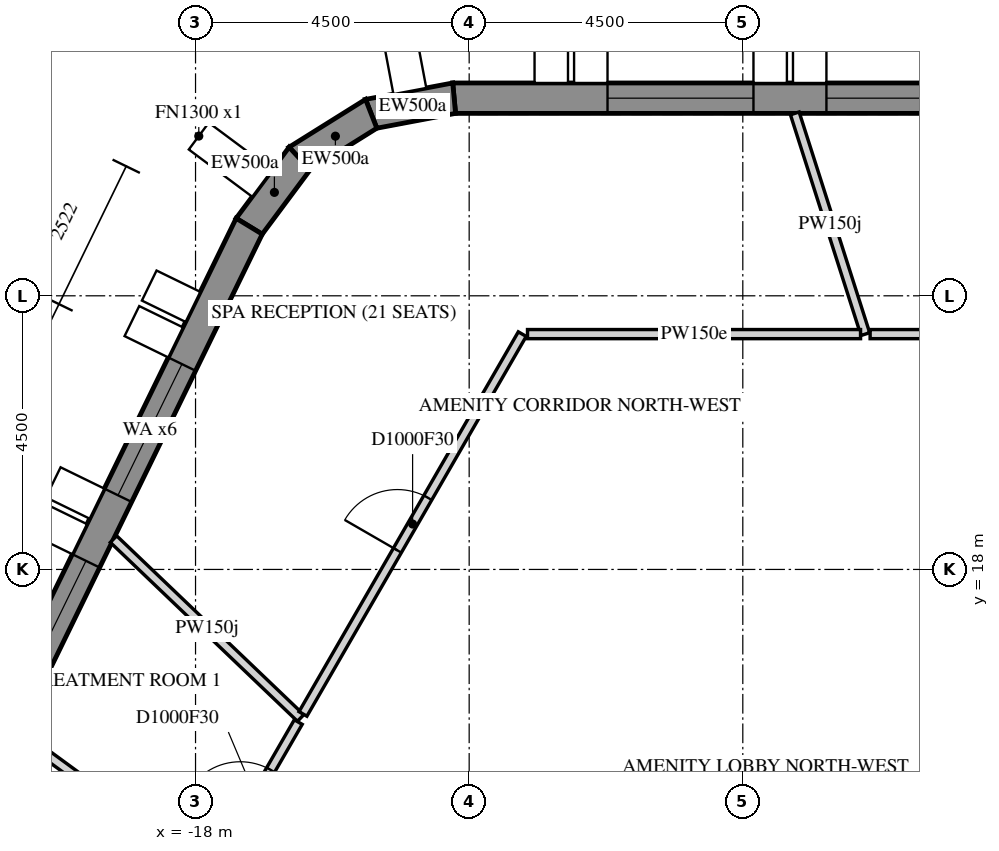
"""IFC4 building model, lengths in metres.
Left out: names, types, materials, properties, quantities, classifications, styles, units other than length and angle.
Written with IfcOpenShell. Run it as: python <this file> out.ifc"""

import sys

from ifc_helpers import new_model, si_unit, direction, frame, frame_2d, origin, place, context, subcontext, project, spatial, polyline, rectangle, outline, extrude, element, fill, save


model = new_model("IFC4")
c1 = context("Model", 3, precision=1e-05, world=origin(), true_north=direction((0.0, 1.0)))
c2 = subcontext(c1, "Body", "Model", "MODEL_VIEW")
j1 = project(units=[si_unit("LENGTHUNIT", "METRE"), si_unit("PLANEANGLEUNIT", "RADIAN")], contexts=[c1])
p1 = place(None, origin())
s1 = spatial("IfcSite", under=j1, at=p1, CompositionType="ELEMENT")
p2 = place(p1, origin())
s2 = spatial("IfcBuilding", under=s1, at=p2, CompositionType="ELEMENT")
p3 = place(p2, frame((0.0, 0.0, 338.1)))
s3 = spatial("IfcBuildingStorey", under=s2, at=p3, CompositionType="ELEMENT", Elevation=338.1)
p4 = place(p3, frame((11.698, 25.75, -0.3), z_axis=(0.0, 0.0, 1.0), x_axis=(-1.0, 0.0, 0.0)))
e1 = element("IfcWall", 1, at=p4, inside=s3, PredefinedType="SOLIDWALL", context=c2, shape_type="SweptSolid", body=[
    extrude(outline(polyline([(-0.021, -0.25), (25.468, -0.25), (25.421, 0.25), (0.021, 0.25), (-0.021, -0.25)])), origin(), (0.0, 0.0, 1.0), 5.4),
])
p5 = place(p4, frame((2.522, 0.0, 1.2)))
e2 = element("IfcOpeningElement", 2, at=p5, cuts=e1, PredefinedType="OPENING", context=c2, shape_type="SweptSolid", body=[
    extrude(rectangle(XDim=2.4, YDim=3.6, at=frame_2d((1.2, 1.8))), frame((0.0, 0.26, 0.0), z_axis=(0.0, -1.0, 0.0), x_axis=(1.0, 0.0, 0.0)), (0.0, 0.0, 1.0), 0.52),
])
p6 = place(p4, frame((6.122, 0.0, 1.2)))
e3 = element("IfcOpeningElement", 3, at=p6, cuts=e1, PredefinedType="OPENING", context=c2, shape_type="SweptSolid", body=[
    extrude(rectangle(XDim=2.4, YDim=3.6, at=frame_2d((1.2, 1.8))), frame((0.0, 0.26, 0.0), z_axis=(0.0, -1.0, 0.0), x_axis=(1.0, 0.0, 0.0)), (0.0, 0.0, 1.0), 0.52),
])
p7 = place(p4, frame((9.722, 0.0, 1.2)))
e4 = element("IfcOpeningElement", 4, at=p7, cuts=e1, PredefinedType="OPENING", context=c2, shape_type="SweptSolid", body=[
    extrude(rectangle(XDim=2.4, YDim=3.6, at=frame_2d((1.2, 1.8))), frame((0.0, 0.26, 0.0), z_axis=(0.0, -1.0, 0.0), x_axis=(1.0, 0.0, 0.0)), (0.0, 0.0, 1.0), 0.52),
])
p8 = place(p4, frame((13.323, 0.0, 1.2)))
e5 = element("IfcOpeningElement", 5, at=p8, cuts=e1, PredefinedType="OPENING", context=c2, shape_type="SweptSolid", body=[
    extrude(rectangle(XDim=2.4, YDim=3.6, at=frame_2d((1.2, 1.8))), frame((0.0, 0.26, 0.0), z_axis=(0.0, -1.0, 0.0), x_axis=(1.0, 0.0, 0.0)), (0.0, 0.0, 1.0), 0.52),
])
p9 = place(p4, frame((16.922, 0.0, 1.2)))
e6 = element("IfcOpeningElement", 6, at=p9, cuts=e1, PredefinedType="OPENING", context=c2, shape_type="SweptSolid", body=[
    extrude(rectangle(XDim=2.4, YDim=3.6, at=frame_2d((1.2, 1.8))), frame((0.0, 0.26, 0.0), z_axis=(0.0, -1.0, 0.0), x_axis=(1.0, 0.0, 0.0)), (0.0, 0.0, 1.0), 0.52),
])
p10 = place(p4, frame((20.522, 0.0, 1.2)))
e7 = element("IfcOpeningElement", 7, at=p10, cuts=e1, PredefinedType="OPENING", context=c2, shape_type="SweptSolid", body=[
    extrude(rectangle(XDim=2.4, YDim=3.6, at=frame_2d((1.2, 1.8))), frame((0.0, 0.26, 0.0), z_axis=(0.0, -1.0, 0.0), x_axis=(1.0, 0.0, 0.0)), (0.0, 0.0, 1.0), 0.52),
])
p11 = place(p3, frame((-13.747, 25.75, -0.3), z_axis=(0.0, 0.0, 1.0), x_axis=(-0.982736538448, -0.185010529429, 0.0)))
e8 = element("IfcWall", 8, at=p11, inside=s3, PredefinedType="SOLIDWALL", context=c2, shape_type="SweptSolid", body=[
    extrude(outline(polyline([(-0.023, -0.25), (1.435, -0.25), (1.341, 0.25), (0.023, 0.25), (-0.023, -0.25)])), origin(), (0.0, 0.0, 1.0), 5.4),
])
p12 = place(p3, frame((-15.111, 25.493, -0.3), z_axis=(0.0, 0.0, 1.0), x_axis=(-0.847978544293, -0.530030554231, 0.0)))
e9 = element("IfcWall", 9, at=p12, inside=s3, PredefinedType="SOLIDWALL", context=c2, shape_type="SweptSolid", body=[
    extrude(outline(polyline([(-0.047, -0.25), (1.435, -0.25), (1.341, 0.25), (0.047, 0.25), (-0.047, -0.25)])), origin(), (0.0, 0.0, 1.0), 5.4),
])
p13 = place(p3, frame((-16.289, 24.757, -0.3), z_axis=(0.0, 0.0, 1.0), x_axis=(-0.597210785942, -0.802084332945, 0.0)))
e10 = element("IfcWall", 10, at=p13, inside=s3, PredefinedType="SOLIDWALL", context=c2, shape_type="SweptSolid", body=[
    extrude(outline(polyline([(-0.047, -0.25), (1.412, -0.25), (1.365, 0.25), (0.047, 0.25), (-0.047, -0.25)])), origin(), (0.0, 0.0, 1.0), 5.4),
])
p14 = place(p3, frame((-17.118, 23.644, -0.3), z_axis=(0.0, 0.0, 1.0), x_axis=(-0.438368241894, -0.898795463106, 0.0)))
e11 = element("IfcWall", 11, at=p14, inside=s3, PredefinedType="SOLIDWALL", context=c2, shape_type="SweptSolid", body=[
    extrude(outline(polyline([(-0.023, -0.25), (25.465, -0.25), (25.424, 0.25), (0.023, 0.25), (-0.023, -0.25)])), origin(), (0.0, 0.0, 1.0), 5.4),
])
p15 = place(p14, frame((2.522, 0.0, 1.2)))
e12 = element("IfcOpeningElement", 12, at=p15, cuts=e11, PredefinedType="OPENING", context=c2, shape_type="SweptSolid", body=[
    extrude(rectangle(XDim=2.4, YDim=3.6, at=frame_2d((1.2, 1.8))), frame((0.0, 0.26, 0.0), z_axis=(0.0, -1.0, 0.0), x_axis=(1.0, 0.0, 0.0)), (0.0, 0.0, 1.0), 0.52),
])
p16 = place(p14, frame((6.122, 0.0, 1.2)))
e13 = element("IfcOpeningElement", 13, at=p16, cuts=e11, PredefinedType="OPENING", context=c2, shape_type="SweptSolid", body=[
    extrude(rectangle(XDim=2.4, YDim=3.6, at=frame_2d((1.2, 1.8))), frame((0.0, 0.26, 0.0), z_axis=(0.0, -1.0, 0.0), x_axis=(1.0, 0.0, 0.0)), (0.0, 0.0, 1.0), 0.52),
])
p17 = place(p14, frame((9.722, 0.0, 1.2)))
e14 = element("IfcOpeningElement", 14, at=p17, cuts=e11, PredefinedType="OPENING", context=c2, shape_type="SweptSolid", body=[
    extrude(rectangle(XDim=2.4, YDim=3.6, at=frame_2d((1.2, 1.8))), frame((0.0, 0.26, 0.0), z_axis=(0.0, -1.0, 0.0), x_axis=(1.0, 0.0, 0.0)), (0.0, 0.0, 1.0), 0.52),
])
p18 = place(p14, frame((13.323, 0.0, 1.2)))
e15 = element("IfcOpeningElement", 15, at=p18, cuts=e11, PredefinedType="OPENING", context=c2, shape_type="SweptSolid", body=[
    extrude(rectangle(XDim=2.4, YDim=3.6, at=frame_2d((1.2, 1.8))), frame((0.0, 0.26, 0.0), z_axis=(0.0, -1.0, 0.0), x_axis=(1.0, 0.0, 0.0)), (0.0, 0.0, 1.0), 0.52),
])
p19 = place(p14, frame((16.922, 0.0, 1.2)))
e16 = element("IfcOpeningElement", 16, at=p19, cuts=e11, PredefinedType="OPENING", context=c2, shape_type="SweptSolid", body=[
    extrude(rectangle(XDim=2.4, YDim=3.6, at=frame_2d((1.2, 1.8))), frame((0.0, 0.26, 0.0), z_axis=(0.0, -1.0, 0.0), x_axis=(1.0, 0.0, 0.0)), (0.0, 0.0, 1.0), 0.52),
])
p20 = place(p14, frame((20.522, 0.0, 1.2)))
e17 = element("IfcOpeningElement", 17, at=p20, cuts=e11, PredefinedType="OPENING", context=c2, shape_type="SweptSolid", body=[
    extrude(rectangle(XDim=2.4, YDim=3.6, at=frame_2d((1.2, 1.8))), frame((0.0, 0.26, 0.0), z_axis=(0.0, -1.0, 0.0), x_axis=(1.0, 0.0, 0.0)), (0.0, 0.0, 1.0), 0.52),
])
p21 = place(p3, frame((-20.912, 15.295, 0.0), z_axis=(0.0, 0.0, 1.0), x_axis=(0.807083298113, -0.590437591882, 0.0)))
e18 = element("IfcWall", 18, at=p21, inside=s3, PredefinedType="PARTITIONING", context=c2, shape_type="SweptSolid", body=[
    extrude(rectangle(XDim=3.91, YDim=0.15, at=frame_2d((1.955, 0.0))), origin(), (0.0, 0.0, 1.0), 4.346),
])
p22 = place(p3, frame((-19.349, 18.499, 0.0), z_axis=(0.0, 0.0, 1.0), x_axis=(0.722785064333, -0.691072898309, 0.0)))
e19 = element("IfcWall", 19, at=p22, inside=s3, PredefinedType="PARTITIONING", context=c2, shape_type="SweptSolid", body=[
    extrude(rectangle(XDim=4.257, YDim=0.15, at=frame_2d((2.129, 0.0))), origin(), (0.0, 0.0, 1.0), 4.346),
])
p23 = place(p3, frame((-17.718, 13.051, 0.0), z_axis=(0.0, 0.0, 1.0), x_axis=(0.4998875608, 0.866090310855, 0.0)))
e20 = element("IfcWall", 20, at=p23, inside=s3, PredefinedType="PARTITIONING", context=c2, shape_type="SweptSolid", body=[
    extrude(rectangle(XDim=2.816, YDim=0.15, at=frame_2d((1.408, 0.0))), origin(), (0.0, 0.0, 1.0), 5.1),
])
p24 = place(p23, frame((0.908, 0.0, 0.0)))
e21 = element("IfcOpeningElement", 21, at=p24, cuts=e20, PredefinedType="OPENING", context=c2, shape_type="SweptSolid", body=[
    extrude(rectangle(XDim=1.0, YDim=2.1, at=frame_2d((0.5, 1.05))), frame((0.0, 0.085, 0.0), z_axis=(0.0, -1.0, 0.0), x_axis=(1.0, 0.0, 0.0)), (0.0, 0.0, 1.0), 0.17),
])
p25 = place(p3, frame((-16.233, 15.624, 0.0), z_axis=(0.0, 0.0, 1.0), x_axis=(0.500012524703, 0.866018172523, 0.0)))
e22 = element("IfcWall", 22, at=p25, inside=s3, PredefinedType="PARTITIONING", context=c2, shape_type="SweptSolid", body=[
    extrude(rectangle(XDim=7.213, YDim=0.15, at=frame_2d((3.606, 0.0))), origin(), (0.0, 0.0, 1.0), 5.1),
])
p26 = place(p25, frame((3.106, 0.0, 0.0)))
e23 = element("IfcOpeningElement", 23, at=p26, cuts=e22, PredefinedType="OPENING", context=c2, shape_type="SweptSolid", body=[
    extrude(rectangle(XDim=1.0, YDim=2.1, at=frame_2d((0.5, 1.05))), frame((0.0, 0.085, 0.0), z_axis=(0.0, -1.0, 0.0), x_axis=(1.0, 0.0, 0.0)), (0.0, 0.0, 1.0), 0.17),
])
p27 = place(p3, frame((-8.145, 25.5, 0.0), z_axis=(0.0, 0.0, 1.0), x_axis=(0.304382836825, -0.952549782765, 0.0)))
e24 = element("IfcWall", 24, at=p27, inside=s3, PredefinedType="PARTITIONING", context=c2, shape_type="SweptSolid", body=[
    extrude(rectangle(XDim=3.811, YDim=0.15, at=frame_2d((1.905, 0.0))), origin(), (0.0, 0.0, 1.0), 4.346),
])
p28 = place(p3, frame((-7.064, 21.87, 0.0), z_axis=(0.0, 0.0, 1.0), x_axis=(-1.0, 0.0, 0.0)))
e25 = element("IfcWall", 25, at=p28, inside=s3, PredefinedType="PARTITIONING", context=c2, shape_type="SweptSolid", body=[
    extrude(rectangle(XDim=5.477, YDim=0.15, at=frame_2d((2.738, 0.0))), origin(), (0.0, 0.0, 1.0), 5.1),
])
p29 = place(p3, frame((-6.906, 21.87, 0.0), z_axis=(0.0, 0.0, 1.0), x_axis=(1.0, 0.0, 0.0)))
e26 = element("IfcWall", 26, at=p29, inside=s3, PredefinedType="PARTITIONING", context=c2, shape_type="SweptSolid", body=[
    extrude(rectangle(XDim=19.302, YDim=0.15, at=frame_2d((9.651, 0.0))), origin(), (0.0, 0.0, 1.0), 5.1),
])
p30 = place(p29, frame((8.751, 0.0, 0.0)))
e27 = element("IfcOpeningElement", 27, at=p30, cuts=e26, PredefinedType="OPENING", context=c2, shape_type="SweptSolid", body=[
    extrude(rectangle(XDim=1.8, YDim=2.1, at=frame_2d((0.9, 1.05))), frame((0.0, 0.085, 0.0), z_axis=(0.0, -1.0, 0.0), x_axis=(1.0, 0.0, 0.0)), (0.0, 0.0, 1.0), 0.17),
])
p31 = place(p9, frame((0.0, 0.18, 0.0)))
e28 = element("IfcWindow", 28, at=p31, inside=s3, PartitioningType="DOUBLE_PANEL_VERTICAL", PredefinedType="WINDOW", context=c2, shape_type="SweptSolid", body=[
    extrude(rectangle(XDim=2.4, YDim=3.6, at=frame_2d((1.2, 1.8))), frame((0.0, 0.03, 0.0), z_axis=(0.0, -1.0, 0.0), x_axis=(1.0, 0.0, 0.0)), (0.0, 0.0, 1.0), 0.06),
])
fill(e6, e28)
p32 = place(p10, frame((0.0, 0.18, 0.0)))
e29 = element("IfcWindow", 29, at=p32, inside=s3, PartitioningType="DOUBLE_PANEL_VERTICAL", PredefinedType="WINDOW", context=c2, shape_type="SweptSolid", body=[
    extrude(rectangle(XDim=2.4, YDim=3.6, at=frame_2d((1.2, 1.8))), frame((0.0, 0.03, 0.0), z_axis=(0.0, -1.0, 0.0), x_axis=(1.0, 0.0, 0.0)), (0.0, 0.0, 1.0), 0.06),
])
fill(e7, e29)
p33 = place(p15, frame((0.0, 0.18, 0.0)))
e30 = element("IfcWindow", 30, at=p33, inside=s3, PartitioningType="DOUBLE_PANEL_VERTICAL", PredefinedType="WINDOW", context=c2, shape_type="SweptSolid", body=[
    extrude(rectangle(XDim=2.4, YDim=3.6, at=frame_2d((1.2, 1.8))), frame((0.0, 0.03, 0.0), z_axis=(0.0, -1.0, 0.0), x_axis=(1.0, 0.0, 0.0)), (0.0, 0.0, 1.0), 0.06),
])
fill(e12, e30)
p34 = place(p16, frame((0.0, 0.18, 0.0)))
e31 = element("IfcWindow", 31, at=p34, inside=s3, PartitioningType="DOUBLE_PANEL_VERTICAL", PredefinedType="WINDOW", context=c2, shape_type="SweptSolid", body=[
    extrude(rectangle(XDim=2.4, YDim=3.6, at=frame_2d((1.2, 1.8))), frame((0.0, 0.03, 0.0), z_axis=(0.0, -1.0, 0.0), x_axis=(1.0, 0.0, 0.0)), (0.0, 0.0, 1.0), 0.06),
])
fill(e13, e31)
p35 = place(p24, origin())
e32 = element("IfcDoor", 32, at=p35, inside=s3, OperationType="SINGLE_SWING_RIGHT", PredefinedType="DOOR", context=c2, shape_type="SweptSolid", body=[
    extrude(rectangle(XDim=1.0, YDim=2.1, at=frame_2d((0.5, 1.05))), frame((0.0, 0.025, 0.0), z_axis=(0.0, -1.0, 0.0), x_axis=(1.0, 0.0, 0.0)), (0.0, 0.0, 1.0), 0.05),
])
fill(e21, e32)
p36 = place(p26, origin())
e33 = element("IfcDoor", 33, at=p36, inside=s3, OperationType="SINGLE_SWING_LEFT", PredefinedType="DOOR", context=c2, shape_type="SweptSolid", body=[
    extrude(rectangle(XDim=1.0, YDim=2.1, at=frame_2d((0.5, 1.05))), frame((0.0, 0.025, 0.0), z_axis=(0.0, -1.0, 0.0), x_axis=(1.0, 0.0, 0.0)), (0.0, 0.0, 1.0), 0.05),
])
fill(e23, e33)
save(model, sys.argv[1])
